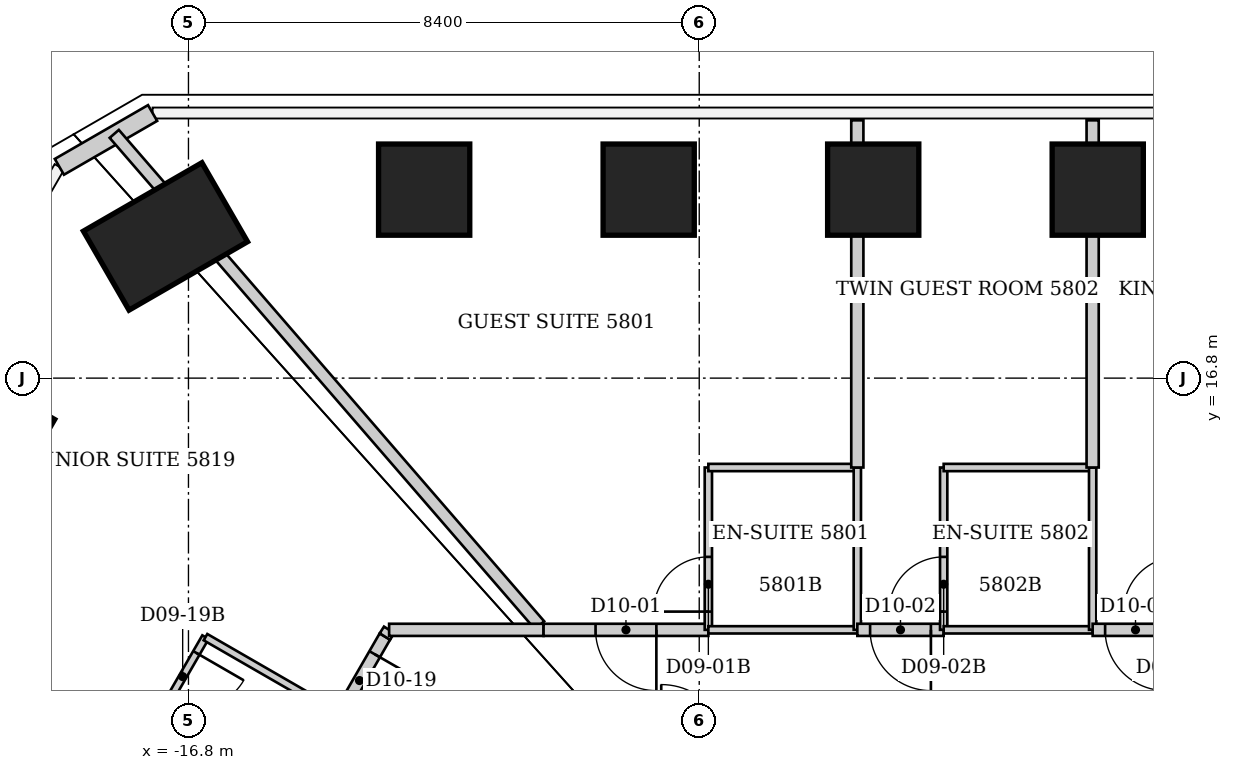
"""IFC4 building model, lengths in metres.
Left out: names, types, materials, properties, quantities, classifications, styles, units other than length and angle.
Written with IfcOpenShell. Run it as: python <this file> out.ifc"""

import sys

from ifc_helpers import new_model, si_unit, direction, frame, frame_2d, origin, origin_2d, place, context, subcontext, project, spatial, rectangle, extrude, element, fill, save


model = new_model("IFC4")
c1 = context("Model", 3, precision=1e-05, world=origin(), true_north=direction((0.0, 1.0)))
c2 = subcontext(c1, "Body", "Model", "MODEL_VIEW")
j1 = project(units=[si_unit("LENGTHUNIT", "METRE"), si_unit("PLANEANGLEUNIT", "RADIAN")], contexts=[c1])
p1 = place(None, origin())
s1 = spatial("IfcSite", under=j1, at=p1, CompositionType="ELEMENT")
p2 = place(p1, origin())
s2 = spatial("IfcBuilding", under=s1, at=p2, CompositionType="ELEMENT")
p3 = place(p2, frame((0.0, 0.0, 232.6)))
s3 = spatial("IfcBuildingStorey", under=s2, at=p3, CompositionType="ELEMENT", Elevation=232.6)
p4 = place(p3, frame((-12.924, 19.9, -0.068), z_axis=(0.035465370418, -0.05455241702, 0.997880875304), x_axis=(0.001454113511, 0.998510791345, 0.054535173247)))
e1 = element("IfcColumn", 1, at=p4, inside=s3, PredefinedType="COLUMN", context=c2, shape_type="SweptSolid", body=[
    extrude(rectangle(XDim=1.5, YDim=1.5, at=origin_2d()), origin(), (0.0, 0.0, 1.0), 3.876),
])
p5 = place(p3, frame((-9.231, 19.9, -0.06), z_axis=(0.025317785915, -0.054550042471, 0.998190013265), x_axis=(0.001183738063, 0.998511018064, 0.054537561078)))
e2 = element("IfcColumn", 2, at=p5, inside=s3, PredefinedType="COLUMN", context=c2, shape_type="SweptSolid", body=[
    extrude(rectangle(XDim=1.5, YDim=1.5, at=origin_2d()), origin(), (0.0, 0.0, 1.0), 3.867),
])
p6 = place(p3, frame((-5.539, 19.9, -0.052), z_axis=(0.015185639925, -0.05460503023, 0.998392551562), x_axis=(0.001041133869, 0.998508010187, 0.054595509263)))
e3 = element("IfcColumn", 3, at=p6, inside=s3, PredefinedType="COLUMN", context=c2, shape_type="SweptSolid", body=[
    extrude(rectangle(XDim=1.5, YDim=1.5, at=origin_2d()), origin(), (0.0, 0.0, 1.0), 3.858),
])
p7 = place(p3, frame((-1.846, 19.9, -0.045), z_axis=(0.005072369293, -0.054591374514, 0.998495895284), x_axis=(0.000138637847, 0.998508769442, 0.054591374109)))
e4 = element("IfcColumn", 4, at=p7, inside=s3, PredefinedType="COLUMN", context=c2, shape_type="SweptSolid", body=[
    extrude(rectangle(XDim=1.5, YDim=1.5, at=origin_2d()), origin(), (0.0, 0.0, 1.0), 3.851),
])
p8 = place(p3, frame((-20.025, 15.846, -0.059), z_axis=(0.054031269339, -0.042795795107, 0.997621742874), x_axis=(-0.86412054036, 0.498643763079, 0.068191563044)))
e5 = element("IfcColumn", 5, at=p8, inside=s3, PredefinedType="COLUMN", context=c2, shape_type="SweptSolid", body=[
    extrude(rectangle(XDim=1.5, YDim=1.5, at=origin_2d()), origin(), (0.0, 0.0, 1.0), 3.868),
])
p9 = place(p3, frame((-17.178, 19.131, -0.069), z_axis=(0.047462720367, -0.052876240197, 0.997472502577), x_axis=(-0.497750920441, 0.864529877343, 0.069513397134)))
e6 = element("IfcColumn", 6, at=p9, inside=s3, PredefinedType="COLUMN", context=c2, shape_type="SweptSolid", body=[
    extrude(rectangle(XDim=1.5, YDim=2.25, at=origin_2d()), origin(), (0.0, 0.0, 1.0), 3.878),
])
p10 = place(p3, frame((-18.923, 20.275, 0.0), z_axis=(0.0, 0.0, 1.0), x_axis=(0.866036293601, 0.499981137809, 0.0)))
e7 = element("IfcWall", 7, at=p10, inside=s3, PredefinedType="SOLIDWALL", context=c2, shape_type="SweptSolid", body=[
    extrude(rectangle(XDim=1.77, YDim=0.3, at=frame_2d((0.885, 0.0))), origin(), (0.0, 0.0, 1.0), 3.64),
])
p11 = place(p3, frame((-20.63, 11.91, 0.0), z_axis=(0.0, 0.0, 1.0), x_axis=(0.866177122335, -0.499737123639, 0.0)))
e8 = element("IfcWall", 8, at=p11, inside=s3, PredefinedType="PARTITIONING", context=c2, shape_type="SweptSolid", body=[
    extrude(rectangle(XDim=2.401, YDim=0.12, at=frame_2d((1.201, 0.0))), origin(), (0.0, 0.0, 1.0), 2.878),
])
p12 = place(p3, frame((-16.52, 12.54, 0.0), z_axis=(0.0, 0.0, 1.0), x_axis=(-0.500291685314, -0.865856933682, 0.0)))
e9 = element("IfcWall", 9, at=p12, inside=s3, PredefinedType="PARTITIONING", context=c2, shape_type="SweptSolid", body=[
    extrude(rectangle(XDim=2.599, YDim=0.12, at=frame_2d((1.299, 0.0))), origin(), (0.0, 0.0, 1.0), 3.64),
])
p13 = place(p12, frame((0.3, 0.0, 0.0)))
e10 = element("IfcOpeningElement", 10, at=p13, cuts=e9, PredefinedType="OPENING", context=c2, shape_type="SweptSolid", body=[
    extrude(rectangle(XDim=0.9, YDim=2.03, at=frame_2d((0.45, 1.015))), frame((0.0, 0.06, 0.0), z_axis=(0.0, -1.0, 0.0), x_axis=(1.0, 0.0, 0.0)), (0.0, 0.0, 1.0), 0.12),
])
p14 = place(p3, frame((-15.61, 9.01, 0.0), z_axis=(0.0, 0.0, 1.0), x_axis=(0.499301665038, 0.866428212428, 0.0)))
e11 = element("IfcWall", 11, at=p14, inside=s3, PredefinedType="PARTITIONING", context=c2, shape_type="SweptSolid", body=[
    extrude(rectangle(XDim=4.086, YDim=0.2, at=frame_2d((2.043, 0.0))), origin(), (0.0, 0.0, 1.0), 3.64),
])
p15 = place(p14, frame((2.75, 0.0, 0.0)))
e12 = element("IfcOpeningElement", 12, at=p15, cuts=e11, PredefinedType="OPENING", context=c2, shape_type="SweptSolid", body=[
    extrude(rectangle(XDim=1.0, YDim=2.13, at=frame_2d((0.5, 1.065))), frame((0.0, 0.1, 0.0), z_axis=(0.0, -1.0, 0.0), x_axis=(1.0, 0.0, 0.0)), (0.0, 0.0, 1.0), 0.2),
])
p16 = place(p3, frame((-14.44, 11.34, 0.0), z_axis=(0.0, 0.0, 1.0), x_axis=(-0.866202511239, 0.499693115345, 0.0)))
e13 = element("IfcWall", 13, at=p16, inside=s3, PredefinedType="PARTITIONING", context=c2, shape_type="SweptSolid", body=[
    extrude(rectangle(XDim=2.401, YDim=0.12, at=frame_2d((1.201, 0.0))), origin(), (0.0, 0.0, 1.0), 3.64),
])
p17 = place(p3, frame((-13.5, 12.66, 0.0), z_axis=(0.0, 0.0, 1.0), x_axis=(-0.537723852201, -0.843121022614, 0.0)))
e14 = element("IfcWall", 14, at=p17, inside=s3, PredefinedType="PARTITIONING", context=c2, shape_type="SweptSolid", body=[
    extrude(rectangle(XDim=0.13, YDim=0.2, at=frame_2d((0.065, 0.0))), origin(), (0.0, 0.0, 1.0), 3.64),
])
p18 = place(p3, frame((-11.025, 12.736, 0.0), z_axis=(0.0, 0.0, 1.0), x_axis=(-0.654431245438, 0.756121514702, 0.0)))
e15 = element("IfcWall", 15, at=p18, inside=s3, PredefinedType="PARTITIONING", context=c2, shape_type="SweptSolid", body=[
    extrude(rectangle(XDim=10.688, YDim=0.2, at=frame_2d((5.344, 0.0))), origin(), (0.0, 0.0, 1.0), 3.64),
])
p19 = place(p3, frame((-10.96, 12.66, 0.0), z_axis=(0.0, 0.0, 1.0), x_axis=(-1.0, 0.0, 0.0)))
e16 = element("IfcWall", 16, at=p19, inside=s3, PredefinedType="PARTITIONING", context=c2, shape_type="SweptSolid", body=[
    extrude(rectangle(XDim=2.54, YDim=0.2, at=frame_2d((1.27, 0.0))), origin(), (0.0, 0.0, 1.0), 3.64),
])
p20 = place(p3, frame((-8.25, 12.66, 0.0), z_axis=(0.0, 0.0, 1.0), x_axis=(-1.0, 0.0, 0.0)))
e17 = element("IfcWall", 17, at=p20, inside=s3, PredefinedType="PARTITIONING", context=c2, shape_type="SweptSolid", body=[
    extrude(rectangle(XDim=2.71, YDim=0.2, at=frame_2d((1.355, 0.0))), origin(), (0.0, 0.0, 1.0), 3.64),
])
p21 = place(p20, frame((0.855, 0.0, 0.0)))
e18 = element("IfcOpeningElement", 18, at=p21, cuts=e17, PredefinedType="OPENING", context=c2, shape_type="SweptSolid", body=[
    extrude(rectangle(XDim=1.0, YDim=2.13, at=frame_2d((0.5, 1.065))), frame((0.0, 0.1, 0.0), z_axis=(0.0, -1.0, 0.0), x_axis=(1.0, 0.0, 0.0)), (0.0, 0.0, 1.0), 0.2),
])
p22 = place(p3, frame((-8.25, 15.33, 0.0), z_axis=(0.0, 0.0, 1.0), x_axis=(0.0, -1.0, 0.0)))
e19 = element("IfcWall", 19, at=p22, inside=s3, PredefinedType="PARTITIONING", context=c2, shape_type="SweptSolid", body=[
    extrude(rectangle(XDim=2.67, YDim=0.12, at=frame_2d((1.335, 0.0))), origin(), (0.0, 0.0, 1.0), 3.64),
])
p23 = place(p22, frame((1.47, 0.0, 0.0)))
e20 = element("IfcOpeningElement", 20, at=p23, cuts=e19, PredefinedType="OPENING", context=c2, shape_type="SweptSolid", body=[
    extrude(rectangle(XDim=0.9, YDim=2.03, at=frame_2d((0.45, 1.015))), frame((0.0, 0.06, 0.0), z_axis=(0.0, -1.0, 0.0), x_axis=(1.0, 0.0, 0.0)), (0.0, 0.0, 1.0), 0.12),
])
for number, where, z_axis, x_axis in (
    (21, (-5.8, 12.66, 0.0), (0.0, 0.0, 1.0), (-1.0, 0.0, 0.0)),
    (22, (-5.8, 15.33, 0.0), (0.0, 0.0, 1.0), (-1.0, 0.0, 0.0)),
):
    element("IfcWall", number, at=place(p3, frame(where, z_axis=z_axis, x_axis=x_axis)), inside=s3, PredefinedType="PARTITIONING", context=c2, shape_type="SweptSolid", body=[
        extrude(rectangle(XDim=2.45, YDim=0.12, at=frame_2d((1.225, 0.0))), origin(), (0.0, 0.0, 1.0), 3.64),
    ])
p24 = place(p3, frame((-5.8, 15.33, 0.0), z_axis=(0.0, 0.0, 1.0), x_axis=(0.0, -1.0, 0.0)))
e23 = element("IfcWall", 23, at=p24, inside=s3, PredefinedType="PARTITIONING", context=c2, shape_type="SweptSolid", body=[
    extrude(rectangle(XDim=2.67, YDim=0.12, at=frame_2d((1.335, 0.0))), origin(), (0.0, 0.0, 1.0), 3.64),
])
p25 = place(p3, frame((-5.8, 21.04, 0.0), z_axis=(0.0, 0.0, 1.0), x_axis=(0.0, -1.0, 0.0)))
e24 = element("IfcWall", 24, at=p25, inside=s3, PredefinedType="PARTITIONING", context=c2, shape_type="SweptSolid", body=[
    extrude(rectangle(XDim=5.71, YDim=0.2, at=frame_2d((2.855, 0.0))), origin(), (0.0, 0.0, 1.0), 3.64),
])
p26 = place(p3, frame((-4.38, 12.66, 0.0), z_axis=(0.0, 0.0, 1.0), x_axis=(-1.0, 0.0, 0.0)))
e25 = element("IfcWall", 25, at=p26, inside=s3, PredefinedType="PARTITIONING", context=c2, shape_type="SweptSolid", body=[
    extrude(rectangle(XDim=1.42, YDim=0.2, at=frame_2d((0.71, 0.0))), origin(), (0.0, 0.0, 1.0), 3.64),
])
p27 = place(p26, frame((0.21, 0.0, 0.0)))
e26 = element("IfcOpeningElement", 26, at=p27, cuts=e25, PredefinedType="OPENING", context=c2, shape_type="SweptSolid", body=[
    extrude(rectangle(XDim=1.0, YDim=2.13, at=frame_2d((0.5, 1.065))), frame((0.0, 0.1, 0.0), z_axis=(0.0, -1.0, 0.0), x_axis=(1.0, 0.0, 0.0)), (0.0, 0.0, 1.0), 0.2),
])
p28 = place(p3, frame((-4.38, 15.33, 0.0), z_axis=(0.0, 0.0, 1.0), x_axis=(0.0, -1.0, 0.0)))
e27 = element("IfcWall", 27, at=p28, inside=s3, PredefinedType="PARTITIONING", context=c2, shape_type="SweptSolid", body=[
    extrude(rectangle(XDim=2.67, YDim=0.12, at=frame_2d((1.335, 0.0))), origin(), (0.0, 0.0, 1.0), 3.64),
])
p29 = place(p28, frame((1.47, 0.0, 0.0)))
e28 = element("IfcOpeningElement", 28, at=p29, cuts=e27, PredefinedType="OPENING", context=c2, shape_type="SweptSolid", body=[
    extrude(rectangle(XDim=0.9, YDim=2.03, at=frame_2d((0.45, 1.015))), frame((0.0, 0.06, 0.0), z_axis=(0.0, -1.0, 0.0), x_axis=(1.0, 0.0, 0.0)), (0.0, 0.0, 1.0), 0.12),
])
for number, where, z_axis, x_axis in (
    (29, (-1.93, 12.66, 0.0), (0.0, 0.0, 1.0), (-1.0, 0.0, 0.0)),
    (30, (-1.93, 15.33, 0.0), (0.0, 0.0, 1.0), (-1.0, 0.0, 0.0)),
):
    element("IfcWall", number, at=place(p3, frame(where, z_axis=z_axis, x_axis=x_axis)), inside=s3, PredefinedType="PARTITIONING", context=c2, shape_type="SweptSolid", body=[
        extrude(rectangle(XDim=2.45, YDim=0.12, at=frame_2d((1.225, 0.0))), origin(), (0.0, 0.0, 1.0), 3.64),
    ])
p30 = place(p3, frame((-1.93, 15.33, 0.0), z_axis=(0.0, 0.0, 1.0), x_axis=(0.0, -1.0, 0.0)))
e31 = element("IfcWall", 31, at=p30, inside=s3, PredefinedType="PARTITIONING", context=c2, shape_type="SweptSolid", body=[
    extrude(rectangle(XDim=2.67, YDim=0.12, at=frame_2d((1.335, 0.0))), origin(), (0.0, 0.0, 1.0), 3.023),
])
p31 = place(p3, frame((-1.93, 21.04, 0.0), z_axis=(0.0, 0.0, 1.0), x_axis=(0.0, -1.0, 0.0)))
e32 = element("IfcWall", 32, at=p31, inside=s3, PredefinedType="PARTITIONING", context=c2, shape_type="SweptSolid", body=[
    extrude(rectangle(XDim=5.71, YDim=0.2, at=frame_2d((2.855, 0.0))), origin(), (0.0, 0.0, 1.0), 3.023),
])
p32 = place(p3, frame((-0.52, 12.66, 0.0), z_axis=(0.0, 0.0, 1.0), x_axis=(-1.0, 0.0, 0.0)))
e33 = element("IfcWall", 33, at=p32, inside=s3, PredefinedType="PARTITIONING", context=c2, shape_type="SweptSolid", body=[
    extrude(rectangle(XDim=1.41, YDim=0.2, at=frame_2d((0.705, 0.0))), origin(), (0.0, 0.0, 1.0), 3.64),
])
p33 = place(p32, frame((0.205, 0.0, 0.0)))
e34 = element("IfcOpeningElement", 34, at=p33, cuts=e33, PredefinedType="OPENING", context=c2, shape_type="SweptSolid", body=[
    extrude(rectangle(XDim=1.0, YDim=2.13, at=frame_2d((0.5, 1.065))), frame((0.0, 0.1, 0.0), z_axis=(0.0, -1.0, 0.0), x_axis=(1.0, 0.0, 0.0)), (0.0, 0.0, 1.0), 0.2),
])
p34 = place(p21, origin())
e35 = element("IfcDoor", 35, at=p34, inside=s3, OperationType="SINGLE_SWING_LEFT", PredefinedType="DOOR", context=c2, shape_type="SweptSolid", body=[
    extrude(rectangle(XDim=1.0, YDim=2.13, at=frame_2d((0.5, 1.065))), frame((0.0, 0.025, 0.0), z_axis=(0.0, -1.0, 0.0), x_axis=(1.0, 0.0, 0.0)), (0.0, 0.0, 1.0), 0.05),
])
fill(e18, e35)
p35 = place(p23, origin())
e36 = element("IfcDoor", 36, at=p35, inside=s3, OperationType="SINGLE_SWING_RIGHT", PredefinedType="DOOR", context=c2, shape_type="SweptSolid", body=[
    extrude(rectangle(XDim=0.9, YDim=2.03, at=frame_2d((0.45, 1.015))), frame((0.0, 0.025, 0.0), z_axis=(0.0, -1.0, 0.0), x_axis=(1.0, 0.0, 0.0)), (0.0, 0.0, 1.0), 0.05),
])
fill(e20, e36)
p36 = place(p27, origin())
e37 = element("IfcDoor", 37, at=p36, inside=s3, OperationType="SINGLE_SWING_LEFT", PredefinedType="DOOR", context=c2, shape_type="SweptSolid", body=[
    extrude(rectangle(XDim=1.0, YDim=2.13, at=frame_2d((0.5, 1.065))), frame((0.0, 0.025, 0.0), z_axis=(0.0, -1.0, 0.0), x_axis=(1.0, 0.0, 0.0)), (0.0, 0.0, 1.0), 0.05),
])
fill(e26, e37)
p37 = place(p29, origin())
e38 = element("IfcDoor", 38, at=p37, inside=s3, OperationType="SINGLE_SWING_RIGHT", PredefinedType="DOOR", context=c2, shape_type="SweptSolid", body=[
    extrude(rectangle(XDim=0.9, YDim=2.03, at=frame_2d((0.45, 1.015))), frame((0.0, 0.025, 0.0), z_axis=(0.0, -1.0, 0.0), x_axis=(1.0, 0.0, 0.0)), (0.0, 0.0, 1.0), 0.05),
])
fill(e28, e38)
p38 = place(p33, origin())
e39 = element("IfcDoor", 39, at=p38, inside=s3, OperationType="SINGLE_SWING_LEFT", PredefinedType="DOOR", context=c2, shape_type="SweptSolid", body=[
    extrude(rectangle(XDim=1.0, YDim=2.13, at=frame_2d((0.5, 1.065))), frame((0.0, 0.025, 0.0), z_axis=(0.0, -1.0, 0.0), x_axis=(1.0, 0.0, 0.0)), (0.0, 0.0, 1.0), 0.05),
])
fill(e34, e39)
p39 = place(p15, origin())
e40 = element("IfcDoor", 40, at=p39, inside=s3, OperationType="SINGLE_SWING_RIGHT", PredefinedType="DOOR", context=c2, shape_type="SweptSolid", body=[
    extrude(rectangle(XDim=1.0, YDim=2.13, at=frame_2d((0.5, 1.065))), frame((0.0, 0.025, 0.0), z_axis=(0.0, -1.0, 0.0), x_axis=(1.0, 0.0, 0.0)), (0.0, 0.0, 1.0), 0.05),
])
fill(e12, e40)
p40 = place(p13, origin())
e41 = element("IfcDoor", 41, at=p40, inside=s3, OperationType="SINGLE_SWING_LEFT", PredefinedType="DOOR", context=c2, shape_type="SweptSolid", body=[
    extrude(rectangle(XDim=0.9, YDim=2.03, at=frame_2d((0.45, 1.015))), frame((0.0, 0.025, 0.0), z_axis=(0.0, -1.0, 0.0), x_axis=(1.0, 0.0, 0.0)), (0.0, 0.0, 1.0), 0.05),
])
fill(e10, e41)
save(model, sys.argv[1])
